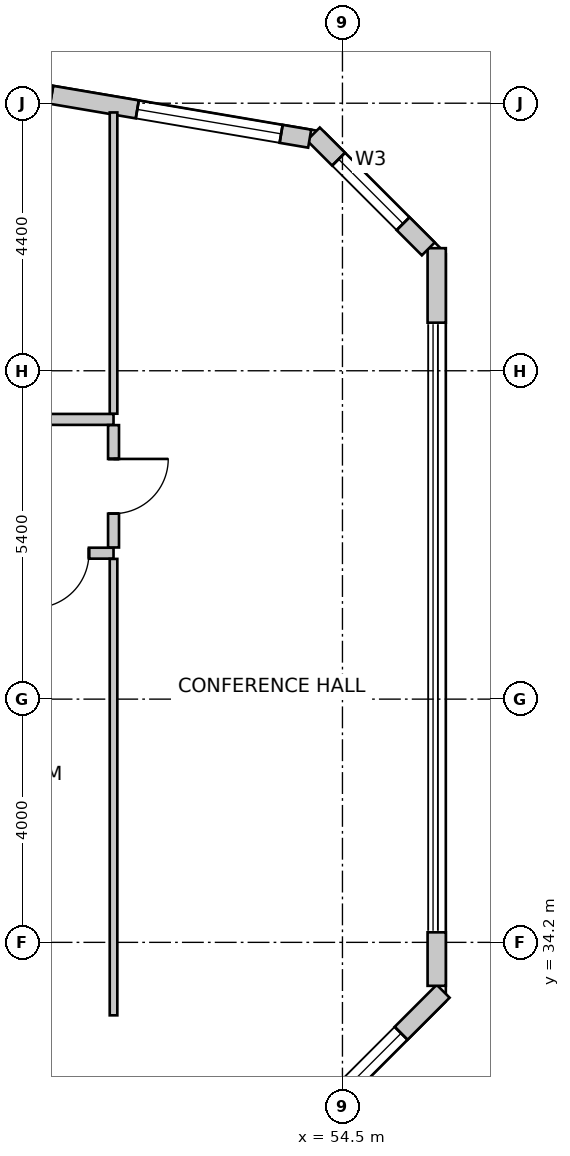
"""IFC4 building model, lengths in metres.
Left out: names, types, materials, properties, quantities, classifications, styles, units other than length and angle.
Written with IfcOpenShell. Run it as: python <this file> out.ifc"""

import sys

from ifc_helpers import new_model, si_unit, direction, frame, frame_2d, origin, place, context, subcontext, project, spatial, rectangle, extrude, source, transform, mapped, element, fill, save


model = new_model("IFC4")
c1 = context("Model", 3, precision=1e-05, world=origin(), true_north=direction((0.0, 1.0)))
c2 = subcontext(c1, "Body", "Model", "MODEL_VIEW")
j1 = project(units=[si_unit("LENGTHUNIT", "METRE"), si_unit("PLANEANGLEUNIT", "RADIAN")], contexts=[c1])
p1 = place(None, origin())
s1 = spatial("IfcSite", under=j1, at=p1, CompositionType="ELEMENT")
p2 = place(p1, origin())
s2 = spatial("IfcBuilding", under=s1, at=p2, CompositionType="ELEMENT")
p3 = place(p2, frame((0.0, 0.0, 91.0)))
s3 = spatial("IfcBuildingStorey", under=s2, at=p3, CompositionType="ELEMENT", Elevation=91.0)
p4 = place(p3, frame((53.076, 30.316, 0.0), z_axis=(0.0, 0.0, 1.0), x_axis=(0.707078757535, 0.707134803727, 0.0)))
e1 = element("IfcWall", 1, at=p4, inside=s3, PredefinedType="SOLIDWALL", context=c2, shape_type="SweptSolid", body=[
    extrude(rectangle(XDim=4.356, YDim=0.3, at=frame_2d((2.178, 0.0))), origin(), (0.0, 0.0, 1.0), 3.75),
])
m1 = source(origin(), c2, "Body", "SweptSolid", [
    extrude(rectangle(XDim=2.4, YDim=2.2, at=frame_2d((1.2, 1.1))), frame((0.0, 0.16, 0.0), z_axis=(0.0, -1.0, 0.0), x_axis=(1.0, 0.0, 0.0)), (0.0, 0.0, 1.0), 0.32),
])
p5 = place(p4, frame((0.978, 0.0, 0.85)))
e2 = element("IfcOpeningElement", 2, at=p5, cuts=e1, PredefinedType="OPENING", context=c2, shape_type="MappedRepresentation", body=[
    mapped(m1, transform((0.0, 0.0, 0.0), scale=1.0)),
])
p6 = place(p3, frame((56.05, 33.485, 0.0), z_axis=(0.0, 0.0, 1.0), x_axis=(0.0, 1.0, 0.0)))
e3 = element("IfcWall", 3, at=p6, inside=s3, PredefinedType="SOLIDWALL", context=c2, shape_type="SweptSolid", body=[
    extrude(rectangle(XDim=0.88, YDim=0.3, at=frame_2d((0.44, 0.0))), origin(), (0.0, 0.0, 1.0), 3.75),
])
p7 = place(p3, frame((56.05, 44.391, 0.0), z_axis=(0.0, 0.0, 1.0), x_axis=(0.0, 1.0, 0.0)))
e4 = element("IfcWall", 4, at=p7, inside=s3, PredefinedType="SOLIDWALL", context=c2, shape_type="SweptSolid", body=[
    extrude(rectangle(XDim=1.225, YDim=0.3, at=frame_2d((0.613, 0.0))), origin(), (0.0, 0.0, 1.0), 3.75),
])
p8 = place(p3, frame((55.912, 45.604, 0.0), z_axis=(0.0, 0.0, 1.0), x_axis=(-0.707152443695, 0.707061115729, 0.0)))
e5 = element("IfcWall", 5, at=p8, inside=s3, PredefinedType="SOLIDWALL", context=c2, shape_type="SweptSolid", body=[
    extrude(rectangle(XDim=2.673, YDim=0.3, at=frame_2d((1.337, 0.0))), origin(), (0.0, 0.0, 1.0), 3.75),
])
m2 = source(origin(), c2, "Body", "SweptSolid", [
    extrude(rectangle(XDim=1.5, YDim=1.8, at=frame_2d((0.75, 0.9))), frame((0.0, 0.16, 0.0), z_axis=(0.0, -1.0, 0.0), x_axis=(1.0, 0.0, 0.0)), (0.0, 0.0, 1.0), 0.32),
])
p9 = place(p8, frame((0.587, 0.0, 0.85)))
e6 = element("IfcOpeningElement", 6, at=p9, cuts=e5, PredefinedType="OPENING", context=c2, shape_type="MappedRepresentation", body=[
    mapped(m2, transform((0.0, 0.0, 0.0), scale=1.0)),
])
p10 = place(p3, frame((53.961, 47.417, 0.0), z_axis=(0.0, 0.0, 1.0), x_axis=(-0.985865713455, 0.167537443678, 0.0)))
e7 = element("IfcWall", 7, at=p10, inside=s3, PredefinedType="SOLIDWALL", context=c2, shape_type="SweptSolid", body=[
    extrude(rectangle(XDim=32.537, YDim=0.3, at=frame_2d((16.269, 0.0))), origin(), (0.0, 0.0, 1.0), 3.75),
])
p11 = place(p10, frame((0.476, 0.0, 0.85)))
e8 = element("IfcOpeningElement", 8, at=p11, cuts=e7, PredefinedType="OPENING", context=c2, shape_type="MappedRepresentation", body=[
    mapped(m1, transform((0.0, 0.0, 0.0), scale=1.0)),
])
m3 = source(origin(), c2, "Body", "SweptSolid", [
    extrude(rectangle(XDim=2.8, YDim=2.4, at=frame_2d((1.4, 1.2))), frame((0.0, 0.16, 0.0), z_axis=(0.0, -1.0, 0.0), x_axis=(1.0, 0.0, 0.0)), (0.0, 0.0, 1.0), 0.32),
])
p12 = place(p10, frame((4.304, 0.0, 0.85)))
e9 = element("IfcOpeningElement", 9, at=p12, cuts=e7, PredefinedType="OPENING", context=c2, shape_type="MappedRepresentation", body=[
    mapped(m3, transform((0.0, 0.0, 0.0), scale=1.0)),
])
p13 = place(p10, frame((8.968, 0.0, 0.85)))
e10 = element("IfcOpeningElement", 10, at=p13, cuts=e7, PredefinedType="OPENING", context=c2, shape_type="MappedRepresentation", body=[
    mapped(m1, transform((0.0, 0.0, 0.0), scale=1.0)),
])
p14 = place(p10, frame((14.034, 0.0, 0.85)))
e11 = element("IfcOpeningElement", 11, at=p14, cuts=e7, PredefinedType="OPENING", context=c2, shape_type="MappedRepresentation", body=[
    mapped(m3, transform((0.0, 0.0, 0.0), scale=1.0)),
])
p15 = place(p10, frame((19.422, 0.0, 0.85)))
e12 = element("IfcOpeningElement", 12, at=p15, cuts=e7, PredefinedType="OPENING", context=c2, shape_type="MappedRepresentation", body=[
    mapped(m1, transform((0.0, 0.0, 0.0), scale=1.0)),
])
p16 = place(p10, frame((24.895, 0.0, 0.85)))
e13 = element("IfcOpeningElement", 13, at=p16, cuts=e7, PredefinedType="OPENING", context=c2, shape_type="MappedRepresentation", body=[
    mapped(m3, transform((0.0, 0.0, 0.0), scale=1.0)),
])
p17 = place(p10, frame((29.395, 0.0, 0.85)))
e14 = element("IfcOpeningElement", 14, at=p17, cuts=e7, PredefinedType="OPENING", context=c2, shape_type="MappedRepresentation", body=[
    mapped(m3, transform((0.0, 0.0, 0.0), scale=1.0)),
])
p18 = place(p3, frame((50.735, 40.6, 0.0), z_axis=(0.0, 0.0, 1.0), x_axis=(-1.0, 0.0, 0.0)))
e15 = element("IfcWall", 15, at=p18, inside=s3, PredefinedType="PARTITIONING", context=c2, shape_type="SweptSolid", body=[
    extrude(rectangle(XDim=4.072, YDim=0.18, at=frame_2d((2.036, 0.0))), origin(), (0.0, 0.0, 1.0), 3.125),
])
m4 = source(origin(), c2, "Body", "SweptSolid", [
    extrude(rectangle(XDim=0.9, YDim=2.15, at=frame_2d((0.45, 1.075))), frame((0.0, 0.1, 0.0), z_axis=(0.0, -1.0, 0.0), x_axis=(1.0, 0.0, 0.0)), (0.0, 0.0, 1.0), 0.2),
])
p19 = place(p18, frame((0.404, 0.0, 0.0)))
e16 = element("IfcOpeningElement", 16, at=p19, cuts=e15, PredefinedType="OPENING", context=c2, shape_type="MappedRepresentation", body=[
    mapped(m4, transform((0.0, 0.0, 0.0), scale=1.0)),
])
p20 = place(p3, frame((41.662, 42.8, 0.0), z_axis=(0.0, 0.0, 1.0), x_axis=(1.0, 0.0, 0.0)))
e17 = element("IfcWall", 17, at=p20, inside=s3, PredefinedType="PARTITIONING", context=c2, shape_type="SweptSolid", body=[
    extrude(rectangle(XDim=9.073, YDim=0.18, at=frame_2d((4.537, 0.0))), origin(), (0.0, 0.0, 1.0), 3.125),
])
p21 = place(p20, frame((4.026, 0.0, 0.0)))
e18 = element("IfcOpeningElement", 18, at=p21, cuts=e17, PredefinedType="OPENING", context=c2, shape_type="MappedRepresentation", body=[
    mapped(m4, transform((0.0, 0.0, 0.0), scale=1.0)),
])
p22 = place(p3, frame((50.735, 42.706, 0.0), z_axis=(0.0, 0.0, 1.0), x_axis=(0.0, -1.0, 0.0)))
e19 = element("IfcWall", 19, at=p22, inside=s3, PredefinedType="PARTITIONING", context=c2, shape_type="SweptSolid", body=[
    extrude(rectangle(XDim=2.012, YDim=0.18, at=frame_2d((1.006, 0.0))), origin(), (0.0, 0.0, 1.0), 3.75),
])
p23 = place(p22, frame((0.556, 0.0, 0.0)))
e20 = element("IfcOpeningElement", 20, at=p23, cuts=e19, PredefinedType="OPENING", context=c2, shape_type="MappedRepresentation", body=[
    mapped(m4, transform((0.0, 0.0, 0.0), scale=1.0)),
])
p24 = place(p3, frame((50.735, 40.506, 0.0), z_axis=(0.0, 0.0, 1.0), x_axis=(0.0, -1.0, 0.0)))
e21 = element("IfcWall", 21, at=p24, inside=s3, PredefinedType="PARTITIONING", context=c2, shape_type="SweptSolid", body=[
    extrude(rectangle(XDim=7.506, YDim=0.125, at=frame_2d((3.753, 0.0))), origin(), (0.0, 0.0, 1.0), 3.75),
])
p25 = place(p3, frame((50.735, 47.848, 0.0), z_axis=(0.0, 0.0, 1.0), x_axis=(0.0, -1.0, 0.0)))
e22 = element("IfcWall", 22, at=p25, inside=s3, PredefinedType="PARTITIONING", context=c2, shape_type="SweptSolid", body=[
    extrude(rectangle(XDim=4.954, YDim=0.125, at=frame_2d((2.477, 0.0))), origin(), (0.0, 0.0, 1.0), 3.75),
])
m5 = source(origin(), c2, "Body", "SweptSolid", [
    extrude(rectangle(XDim=2.4, YDim=2.2, at=frame_2d((1.2, 1.1))), frame((0.0, -0.015, 0.0), z_axis=(0.0, -1.0, 0.0), x_axis=(1.0, 0.0, 0.0)), (0.0, 0.0, 1.0), 0.06),
])
p26 = place(p5, origin())
e23 = element("IfcWindow", 23, at=p26, inside=s3, PartitioningType="SINGLE_PANEL", PredefinedType="WINDOW", context=c2, shape_type="MappedRepresentation", body=[
    mapped(m5, transform((0.0, 0.0, 0.0), scale=1.0)),
])
fill(e2, e23)
m6 = source(origin(), c2, "Body", "SweptSolid", [
    extrude(rectangle(XDim=1.5, YDim=1.8, at=frame_2d((0.75, 0.9))), frame((0.0, -0.015, 0.0), z_axis=(0.0, -1.0, 0.0), x_axis=(1.0, 0.0, 0.0)), (0.0, 0.0, 1.0), 0.06),
])
p27 = place(p9, origin())
e24 = element("IfcWindow", 24, at=p27, inside=s3, PartitioningType="SINGLE_PANEL", PredefinedType="WINDOW", context=c2, shape_type="MappedRepresentation", body=[
    mapped(m6, transform((0.0, 0.0, 0.0), scale=1.0)),
])
fill(e6, e24)
p28 = place(p11, origin())
e25 = element("IfcWindow", 25, at=p28, inside=s3, PartitioningType="SINGLE_PANEL", PredefinedType="WINDOW", context=c2, shape_type="MappedRepresentation", body=[
    mapped(m5, transform((0.0, 0.0, 0.0), scale=1.0)),
])
fill(e8, e25)
m7 = source(origin(), c2, "Body", "SweptSolid", [
    extrude(rectangle(XDim=0.9, YDim=2.15, at=frame_2d((0.45, 1.075))), frame((0.0, 0.025, 0.0), z_axis=(0.0, -1.0, 0.0), x_axis=(1.0, 0.0, 0.0)), (0.0, 0.0, 1.0), 0.05),
])
p29 = place(p19, origin())
e26 = element("IfcDoor", 26, at=p29, inside=s3, OperationType="SINGLE_SWING_RIGHT", PredefinedType="DOOR", context=c2, shape_type="MappedRepresentation", body=[
    mapped(m7, transform((0.0, 0.0, 0.0), scale=1.0)),
])
fill(e16, e26)
p30 = place(p23, origin())
e27 = element("IfcDoor", 27, at=p30, inside=s3, OperationType="SINGLE_SWING_LEFT", PredefinedType="DOOR", context=c2, shape_type="MappedRepresentation", body=[
    mapped(m7, transform((0.0, 0.0, 0.0), scale=1.0)),
])
fill(e20, e27)
save(model, sys.argv[1])
